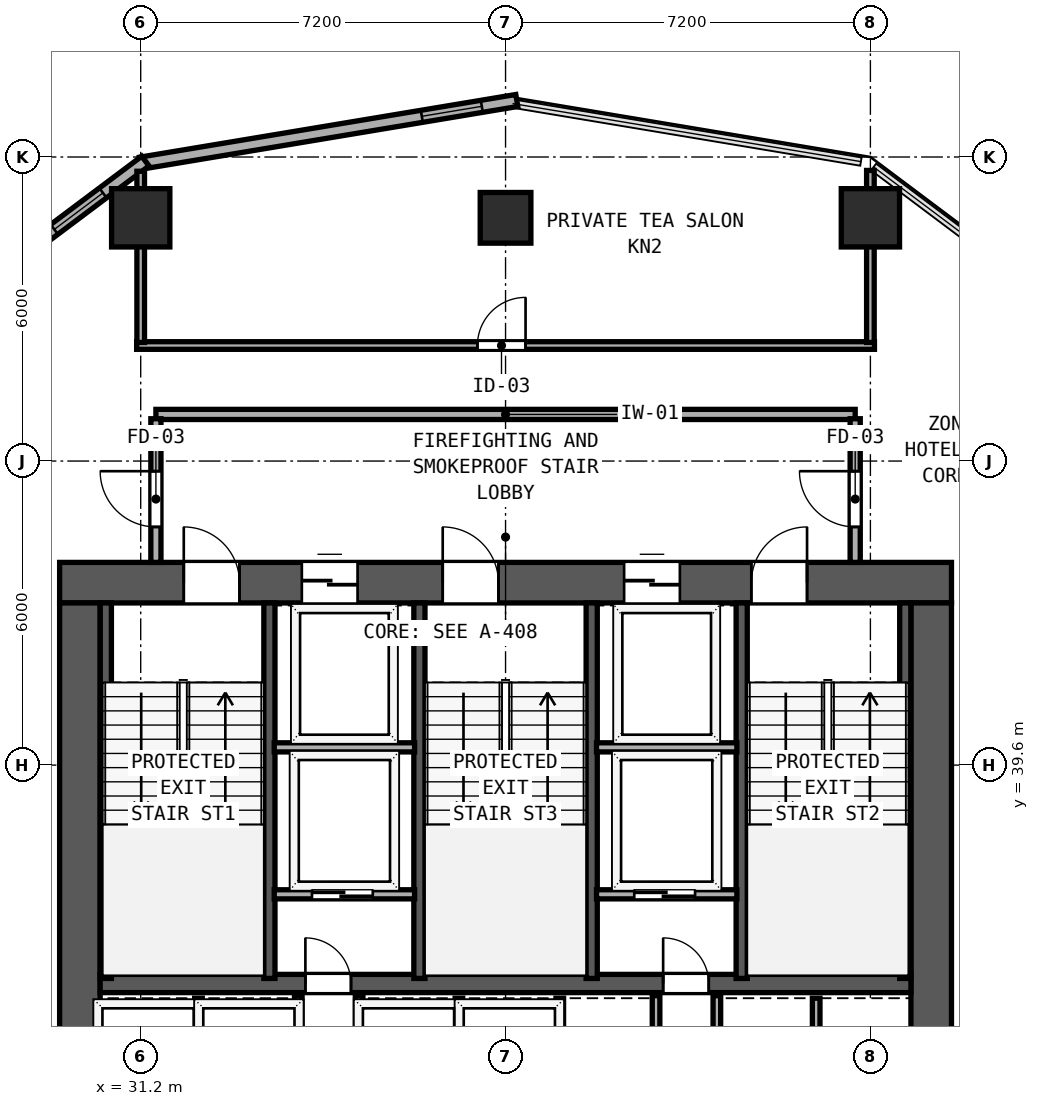
"""IFC4 building model, lengths in metres.
Left out: names, types, materials, properties, quantities, classifications, styles, units other than length and angle.
Written with IfcOpenShell. Run it as: python <this file> out.ifc"""

import sys

from ifc_helpers import new_model, si_unit, direction, frame, frame_2d, origin, origin_2d, place, context, subcontext, project, spatial, rectangle, hollow_rectangle, extrude, element, fill, save


model = new_model("IFC4")
c1 = context("Model", 3, precision=1e-05, world=origin(), true_north=direction((0.0, 1.0)))
c2 = subcontext(c1, "Body", "Model", "MODEL_VIEW")
j1 = project(units=[si_unit("LENGTHUNIT", "METRE"), si_unit("PLANEANGLEUNIT", "RADIAN")], contexts=[c1])
p1 = place(None, origin())
s1 = spatial("IfcSite", under=j1, at=p1, CompositionType="ELEMENT")
p2 = place(p1, origin())
s2 = spatial("IfcBuilding", under=s1, at=p2, CompositionType="ELEMENT")
p3 = place(p2, frame((0.0, 0.0, 59.0)))
s3 = spatial("IfcBuildingStorey", under=s2, at=p3, CompositionType="ELEMENT", Elevation=59.0)
p4 = place(p3, frame((29.6, 43.2, 0.0), z_axis=(0.0, 0.0, 1.0), x_axis=(1.0, 0.0, 0.0)))
e1 = element("IfcWall", 1, at=p4, inside=s3, PredefinedType="SHEAR", context=c2, shape_type="SweptSolid", body=[
    extrude(rectangle(XDim=17.6, YDim=0.8, at=frame_2d((8.8, 0.0))), origin(), (0.0, 0.0, 1.0), 3.6),
])
p5 = place(p4, frame((2.45, 0.0, 0.0)))
e2 = element("IfcOpeningElement", 2, at=p5, cuts=e1, PredefinedType="OPENING", context=c2, shape_type="SweptSolid", body=[
    extrude(rectangle(XDim=1.1, YDim=2.15, at=frame_2d((0.55, 1.075))), frame((0.0, 0.41, 0.0), z_axis=(0.0, -1.0, 0.0), x_axis=(1.0, 0.0, 0.0)), (0.0, 0.0, 1.0), 0.82),
])
p6 = place(p4, frame((7.56, 0.0, 0.0)))
e3 = element("IfcOpeningElement", 3, at=p6, cuts=e1, PredefinedType="OPENING", context=c2, shape_type="SweptSolid", body=[
    extrude(rectangle(XDim=1.1, YDim=2.15, at=frame_2d((0.55, 1.075))), frame((0.0, 0.41, 0.0), z_axis=(0.0, -1.0, 0.0), x_axis=(1.0, 0.0, 0.0)), (0.0, 0.0, 1.0), 0.82),
])
p7 = place(p4, frame((13.65, 0.0, 0.0)))
e4 = element("IfcOpeningElement", 4, at=p7, cuts=e1, PredefinedType="OPENING", context=c2, shape_type="SweptSolid", body=[
    extrude(rectangle(XDim=1.1, YDim=2.15, at=frame_2d((0.55, 1.075))), frame((0.0, 0.41, 0.0), z_axis=(0.0, -1.0, 0.0), x_axis=(1.0, 0.0, 0.0)), (0.0, 0.0, 1.0), 0.82),
])
p8 = place(p4, frame((4.78, 0.0, 0.0)))
e5 = element("IfcOpeningElement", 5, at=p8, cuts=e1, PredefinedType="OPENING", context=c2, shape_type="SweptSolid", body=[
    extrude(rectangle(XDim=1.1, YDim=2.2, at=frame_2d((0.55, 1.1))), frame((0.0, 0.41, 0.0), z_axis=(0.0, -1.0, 0.0), x_axis=(1.0, 0.0, 0.0)), (0.0, 0.0, 1.0), 0.82),
])
p9 = place(p4, frame((11.14, 0.0, 0.0)))
e6 = element("IfcOpeningElement", 6, at=p9, cuts=e1, PredefinedType="OPENING", context=c2, shape_type="SweptSolid", body=[
    extrude(rectangle(XDim=1.1, YDim=2.2, at=frame_2d((0.55, 1.1))), frame((0.0, 0.41, 0.0), z_axis=(0.0, -1.0, 0.0), x_axis=(1.0, 0.0, 0.0)), (0.0, 0.0, 1.0), 0.82),
])
for number, where, z_axis, x_axis in (
    (7, (30.0, 32.8, 0.0), (0.0, 0.0, 1.0), (0.0, 1.0, 0.0)),
    (8, (46.8, 32.8, 0.0), (0.0, 0.0, 1.0), (0.0, 1.0, 0.0)),
):
    element("IfcWall", number, at=place(p3, frame(where, z_axis=z_axis, x_axis=x_axis)), inside=s3, PredefinedType="SHEAR", context=c2, shape_type="SweptSolid", body=[
        extrude(rectangle(XDim=10.0, YDim=0.8, at=frame_2d((5.0, 0.0))), origin(), (0.0, 0.0, 1.0), 3.6),
    ])
p10 = place(p3, frame((30.4, 35.29, 0.0), z_axis=(0.0, 0.0, 1.0), x_axis=(1.0, 0.0, 0.0)))
e9 = element("IfcWall", 9, at=p10, inside=s3, PredefinedType="SHEAR", context=c2, shape_type="SweptSolid", body=[
    extrude(rectangle(XDim=16.0, YDim=0.36, at=frame_2d((8.0, 0.0))), origin(), (0.0, 0.0, 1.0), 3.6),
])
p11 = place(p10, frame((4.95, 0.0, 0.0), z_axis=(0.0, 0.0, 1.0), x_axis=(-1.0, 0.0, 0.0)))
e10 = element("IfcOpeningElement", 10, at=p11, cuts=e9, PredefinedType="OPENING", context=c2, shape_type="SweptSolid", body=[
    extrude(rectangle(XDim=0.9, YDim=2.1, at=frame_2d((0.45, 1.05))), frame((0.0, 0.19, 0.0), z_axis=(0.0, -1.0, 0.0), x_axis=(1.0, 0.0, 0.0)), (0.0, 0.0, 1.0), 0.38),
])
p12 = place(p10, frame((12.01, 0.0, 0.0), z_axis=(0.0, 0.0, 1.0), x_axis=(-1.0, 0.0, 0.0)))
e11 = element("IfcOpeningElement", 11, at=p12, cuts=e9, PredefinedType="OPENING", context=c2, shape_type="SweptSolid", body=[
    extrude(rectangle(XDim=0.9, YDim=2.1, at=frame_2d((0.45, 1.05))), frame((0.0, 0.19, 0.0), z_axis=(0.0, -1.0, 0.0), x_axis=(1.0, 0.0, 0.0)), (0.0, 0.0, 1.0), 0.38),
])
for number, where, z_axis, x_axis in (
    (12, (30.512, 35.39, 0.0), (0.0, 0.0, 1.0), (0.0, 1.0, 0.0)),
    (13, (33.74, 35.39, 0.0), (0.0, 0.0, 1.0), (0.0, 1.0, 0.0)),
    (14, (36.7, 35.39, 0.0), (0.0, 0.0, 1.0), (0.0, 1.0, 0.0)),
    (15, (40.1, 35.39, 0.0), (0.0, 0.0, 1.0), (0.0, 1.0, 0.0)),
    (16, (43.06, 35.39, 0.0), (0.0, 0.0, 1.0), (0.0, 1.0, 0.0)),
    (17, (46.288, 35.39, 0.0), (0.0, 0.0, 1.0), (0.0, 1.0, 0.0)),
):
    element("IfcWall", number, at=place(p3, frame(where, z_axis=z_axis, x_axis=x_axis)), inside=s3, PredefinedType="SHEAR", context=c2, shape_type="SweptSolid", body=[
        extrude(rectangle(XDim=7.41, YDim=0.22, at=frame_2d((3.705, 0.0))), origin(), (0.0, 0.0, 1.0), 3.6),
    ])
for number, where, z_axis, x_axis in (
    (18, (31.2, 50.4, 0.0), (0.0, 0.0, 1.0), (1.0, 0.0, 0.0)),
    (19, (45.6, 50.4, 0.0), (0.0, 0.0, 1.0), (1.0, 0.0, 0.0)),
):
    element("IfcColumn", number, at=place(p3, frame(where, z_axis=z_axis, x_axis=x_axis)), inside=s3, PredefinedType="COLUMN", context=c2, shape_type="SweptSolid", body=[
        extrude(hollow_rectangle(XDim=1.15, YDim=1.15, WallThickness=0.042, at=origin_2d()), origin(), (0.0, 0.0, 1.0), 3.8),
    ])
p13 = place(p3, frame((38.4, 50.4, 0.0), z_axis=(0.0, 0.0, 1.0), x_axis=(1.0, 0.0, 0.0)))
e20 = element("IfcColumn", 20, at=p13, inside=s3, PredefinedType="COLUMN", context=c2, shape_type="SweptSolid", body=[
    extrude(hollow_rectangle(XDim=1.0, YDim=1.0, WallThickness=0.038, at=origin_2d()), origin(), (0.0, 0.0, 1.0), 3.8),
])
p14 = place(p3, frame((38.622, 52.715, 0.0), z_axis=(0.0, 0.0, 1.0), x_axis=(-0.98639129485, -0.164414760418, 0.0)))
e21 = element("IfcWall", 21, at=p14, inside=s3, PredefinedType="SOLIDWALL", context=c2, shape_type="SweptSolid", body=[
    extrude(rectangle(XDim=7.53, YDim=0.24, at=frame_2d((3.765, 0.0))), origin(), (0.0, 0.0, 1.0), 3.6),
])
p15 = place(p14, frame((0.7, 0.0, 0.85)))
e22 = element("IfcOpeningElement", 22, at=p15, cuts=e21, PredefinedType="OPENING", context=c2, shape_type="SweptSolid", body=[
    extrude(rectangle(XDim=1.2, YDim=1.85, at=frame_2d((0.6, 0.925))), frame((0.0, 0.13, 0.0), z_axis=(0.0, -1.0, 0.0), x_axis=(1.0, 0.0, 0.0)), (0.0, 0.0, 1.0), 0.26),
])
p16 = place(p3, frame((31.292, 51.519, 0.0), z_axis=(0.0, 0.0, 1.0), x_axis=(-0.8, -0.6, 0.0)))
e23 = element("IfcWall", 23, at=p16, inside=s3, PredefinedType="SOLIDWALL", context=c2, shape_type="SweptSolid", body=[
    extrude(rectangle(XDim=6.021, YDim=0.24, at=frame_2d((3.01, 0.0))), origin(), (0.0, 0.0, 1.0), 3.6),
])
p17 = place(p16, frame((1.047, 0.0, 0.85)))
e24 = element("IfcOpeningElement", 24, at=p17, cuts=e23, PredefinedType="OPENING", context=c2, shape_type="SweptSolid", body=[
    extrude(rectangle(XDim=1.2, YDim=1.85, at=frame_2d((0.6, 0.925))), frame((0.0, 0.13, 0.0), z_axis=(0.0, -1.0, 0.0), x_axis=(1.0, 0.0, 0.0)), (0.0, 0.0, 1.0), 0.26),
])
p18 = place(p3, frame((31.5, 46.52, 0.0), z_axis=(0.0, 0.0, 1.0), x_axis=(1.0, 0.0, 0.0)))
e25 = element("IfcWall", 25, at=p18, inside=s3, PredefinedType="SOLIDWALL", context=c2, shape_type="SweptSolid", body=[
    extrude(rectangle(XDim=13.8, YDim=0.2, at=frame_2d((6.9, 0.0))), origin(), (0.0, 0.0, 1.0), 3.6),
])
p19 = place(p3, frame((31.5, 43.6, 0.0), z_axis=(0.0, 0.0, 1.0), x_axis=(0.0, 1.0, 0.0)))
e26 = element("IfcWall", 26, at=p19, inside=s3, PredefinedType="SOLIDWALL", context=c2, shape_type="SweptSolid", body=[
    extrude(rectangle(XDim=2.835, YDim=0.2, at=frame_2d((1.417, 0.0))), origin(), (0.0, 0.0, 1.0), 3.6),
])
p20 = place(p19, frame((1.8, 0.0, 0.0), z_axis=(0.0, 0.0, 1.0), x_axis=(-1.0, 0.0, 0.0)))
e27 = element("IfcOpeningElement", 27, at=p20, cuts=e26, PredefinedType="OPENING", context=c2, shape_type="SweptSolid", body=[
    extrude(rectangle(XDim=1.1, YDim=2.15, at=frame_2d((0.55, 1.075))), frame((0.0, 0.11, 0.0), z_axis=(0.0, -1.0, 0.0), x_axis=(1.0, 0.0, 0.0)), (0.0, 0.0, 1.0), 0.22),
])
p21 = place(p3, frame((45.3, 43.6, 0.0), z_axis=(0.0, 0.0, 1.0), x_axis=(0.0, 1.0, 0.0)))
e28 = element("IfcWall", 28, at=p21, inside=s3, PredefinedType="SOLIDWALL", context=c2, shape_type="SweptSolid", body=[
    extrude(rectangle(XDim=2.835, YDim=0.2, at=frame_2d((1.417, 0.0))), origin(), (0.0, 0.0, 1.0), 3.6),
])
p22 = place(p21, frame((0.7, 0.0, 0.0)))
e29 = element("IfcOpeningElement", 29, at=p22, cuts=e28, PredefinedType="OPENING", context=c2, shape_type="SweptSolid", body=[
    extrude(rectangle(XDim=1.1, YDim=2.15, at=frame_2d((0.55, 1.075))), frame((0.0, 0.11, 0.0), z_axis=(0.0, -1.0, 0.0), x_axis=(1.0, 0.0, 0.0)), (0.0, 0.0, 1.0), 0.22),
])
for number, where, z_axis, x_axis in (
    (30, (33.835, 39.95, 0.0), (0.0, 0.0, 1.0), (1.0, 0.0, 0.0)),
    (31, (40.195, 39.95, 0.0), (0.0, 0.0, 1.0), (1.0, 0.0, 0.0)),
):
    element("IfcWall", number, at=place(p3, frame(where, z_axis=z_axis, x_axis=x_axis)), inside=s3, PredefinedType="SOLIDWALL", context=c2, shape_type="SweptSolid", body=[
        extrude(rectangle(XDim=2.77, YDim=0.18, at=frame_2d((1.385, 0.0))), origin(), (0.0, 0.0, 1.0), 3.6),
    ])
p23 = place(p3, frame((33.835, 37.05, 0.0), z_axis=(0.0, 0.0, 1.0), x_axis=(1.0, 0.0, 0.0)))
e32 = element("IfcWall", 32, at=p23, inside=s3, PredefinedType="SOLIDWALL", context=c2, shape_type="SweptSolid", body=[
    extrude(rectangle(XDim=2.77, YDim=0.18, at=frame_2d((1.385, 0.0))), origin(), (0.0, 0.0, 1.0), 3.6),
])
p24 = place(p23, frame((1.945, 0.0, 0.0), z_axis=(0.0, 0.0, 1.0), x_axis=(-1.0, 0.0, 0.0)))
e33 = element("IfcOpeningElement", 33, at=p24, cuts=e32, PredefinedType="OPENING", context=c2, shape_type="SweptSolid", body=[
    extrude(rectangle(XDim=1.2, YDim=2.2, at=frame_2d((0.6, 1.1))), frame((0.0, 0.1, 0.0), z_axis=(0.0, -1.0, 0.0), x_axis=(1.0, 0.0, 0.0)), (0.0, 0.0, 1.0), 0.2),
])
for number, where, z_axis, x_axis in (
    (34, (34.31, 32.88, 0.0), (0.0, 0.0, 1.0), (0.0, 1.0, 0.0)),
    (35, (35.51, 32.88, 0.0), (0.0, 0.0, 1.0), (0.0, 1.0, 0.0)),
):
    element("IfcWall", number, at=place(p3, frame(where, z_axis=z_axis, x_axis=x_axis)), inside=s3, PredefinedType="SOLIDWALL", context=c2, shape_type="SweptSolid", body=[
        extrude(rectangle(XDim=2.17, YDim=0.15, at=frame_2d((1.085, 0.0))), origin(), (0.0, 0.0, 1.0), 3.6),
    ])
p25 = place(p3, frame((40.195, 37.05, 0.0), z_axis=(0.0, 0.0, 1.0), x_axis=(1.0, 0.0, 0.0)))
e36 = element("IfcWall", 36, at=p25, inside=s3, PredefinedType="SOLIDWALL", context=c2, shape_type="SweptSolid", body=[
    extrude(rectangle(XDim=2.77, YDim=0.18, at=frame_2d((1.385, 0.0))), origin(), (0.0, 0.0, 1.0), 3.6),
])
p26 = place(p25, frame((1.945, 0.0, 0.0), z_axis=(0.0, 0.0, 1.0), x_axis=(-1.0, 0.0, 0.0)))
e37 = element("IfcOpeningElement", 37, at=p26, cuts=e36, PredefinedType="OPENING", context=c2, shape_type="SweptSolid", body=[
    extrude(rectangle(XDim=1.2, YDim=2.2, at=frame_2d((0.6, 1.1))), frame((0.0, 0.1, 0.0), z_axis=(0.0, -1.0, 0.0), x_axis=(1.0, 0.0, 0.0)), (0.0, 0.0, 1.0), 0.2),
])
for number, where, z_axis, x_axis in (
    (38, (41.37, 32.88, 0.0), (0.0, 0.0, 1.0), (0.0, 1.0, 0.0)),
    (39, (42.57, 32.88, 0.0), (0.0, 0.0, 1.0), (0.0, 1.0, 0.0)),
):
    element("IfcWall", number, at=place(p3, frame(where, z_axis=z_axis, x_axis=x_axis)), inside=s3, PredefinedType="SOLIDWALL", context=c2, shape_type="SweptSolid", body=[
        extrude(rectangle(XDim=2.17, YDim=0.15, at=frame_2d((1.085, 0.0))), origin(), (0.0, 0.0, 1.0), 3.6),
    ])
for number, where, z_axis, x_axis in (
    (40, (32.34, 32.95, 0.0), (0.0, 0.0, 1.0), (0.0, 1.0, 0.0)),
    (41, (37.48, 32.95, 0.0), (0.0, 0.0, 1.0), (0.0, 1.0, 0.0)),
    (42, (39.47, 32.95, 0.0), (0.0, 0.0, 1.0), (0.0, 1.0, 0.0)),
    (43, (44.53, 32.95, 0.0), (0.0, 0.0, 1.0), (0.0, 1.0, 0.0)),
):
    element("IfcWall", number, at=place(p3, frame(where, z_axis=z_axis, x_axis=x_axis)), inside=s3, PredefinedType="SOLIDWALL", context=c2, shape_type="SweptSolid", body=[
        extrude(rectangle(XDim=2.05, YDim=0.15, at=frame_2d((1.025, 0.0))), origin(), (0.0, 0.0, 1.0), 3.6),
    ])
p27 = place(p3, frame((31.12, 47.88, 0.0), z_axis=(0.0, 0.0, 1.0), x_axis=(1.0, 0.0, 0.0)))
e44 = element("IfcWall", 44, at=p27, inside=s3, PredefinedType="PARTITIONING", context=c2, shape_type="SweptSolid", body=[
    extrude(rectangle(XDim=14.56, YDim=0.15, at=frame_2d((7.28, 0.0))), origin(), (0.0, 0.0, 1.0), 3.6),
])
p28 = place(p27, frame((6.725, 0.0, 0.0)))
e45 = element("IfcOpeningElement", 45, at=p28, cuts=e44, PredefinedType="OPENING", context=c2, shape_type="SweptSolid", body=[
    extrude(rectangle(XDim=0.95, YDim=2.12, at=frame_2d((0.475, 1.06))), frame((0.0, 0.085, 0.0), z_axis=(0.0, -1.0, 0.0), x_axis=(1.0, 0.0, 0.0)), (0.0, 0.0, 1.0), 0.17),
])
p29 = place(p3, frame((31.2, 47.94, 0.0), z_axis=(0.0, 0.0, 1.0), x_axis=(0.0, 1.0, 0.0)))
e46 = element("IfcWall", 46, at=p29, inside=s3, PredefinedType="PARTITIONING", context=c2, shape_type="SweptSolid", body=[
    extrude(rectangle(XDim=3.379, YDim=0.15, at=frame_2d((1.689, 0.0))), origin(), (0.0, 0.0, 1.0), 2.985),
])
p30 = place(p3, frame((45.6, 47.94, 0.0), z_axis=(0.0, 0.0, 1.0), x_axis=(0.0, 1.0, 0.0)))
e47 = element("IfcWall", 47, at=p30, inside=s3, PredefinedType="PARTITIONING", context=c2, shape_type="SweptSolid", body=[
    extrude(rectangle(XDim=3.395, YDim=0.15, at=frame_2d((1.698, 0.0))), origin(), (0.0, 0.0, 1.0), 2.985),
])
p31 = place(p15, origin())
e48 = element("IfcWindow", 48, at=p31, inside=s3, PartitioningType="SINGLE_PANEL", PredefinedType="WINDOW", context=c2, shape_type="SweptSolid", body=[
    extrude(rectangle(XDim=1.2, YDim=1.85, at=frame_2d((0.6, 0.925))), frame((0.0, 0.03, 0.0), z_axis=(0.0, -1.0, 0.0), x_axis=(1.0, 0.0, 0.0)), (0.0, 0.0, 1.0), 0.06),
])
fill(e22, e48)
p32 = place(p17, origin())
e49 = element("IfcWindow", 49, at=p32, inside=s3, PartitioningType="SINGLE_PANEL", PredefinedType="WINDOW", context=c2, shape_type="SweptSolid", body=[
    extrude(rectangle(XDim=1.2, YDim=1.85, at=frame_2d((0.6, 0.925))), frame((0.0, 0.03, 0.0), z_axis=(0.0, -1.0, 0.0), x_axis=(1.0, 0.0, 0.0)), (0.0, 0.0, 1.0), 0.06),
])
fill(e24, e49)
p33 = place(p5, origin())
e50 = element("IfcDoor", 50, at=p33, inside=s3, OperationType="SINGLE_SWING_LEFT", PredefinedType="DOOR", context=c2, shape_type="SweptSolid", body=[
    extrude(rectangle(XDim=1.1, YDim=2.15, at=frame_2d((0.55, 1.075))), frame((0.0, 0.185, 0.0), z_axis=(0.0, -1.0, 0.0), x_axis=(1.0, 0.0, 0.0)), (0.0, 0.0, 1.0), 0.05),
])
fill(e2, e50)
p34 = place(p6, origin())
e51 = element("IfcDoor", 51, at=p34, inside=s3, OperationType="SINGLE_SWING_LEFT", PredefinedType="DOOR", context=c2, shape_type="SweptSolid", body=[
    extrude(rectangle(XDim=1.1, YDim=2.15, at=frame_2d((0.55, 1.075))), frame((0.0, 0.185, 0.0), z_axis=(0.0, -1.0, 0.0), x_axis=(1.0, 0.0, 0.0)), (0.0, 0.0, 1.0), 0.05),
])
fill(e3, e51)
p35 = place(p7, origin())
e52 = element("IfcDoor", 52, at=p35, inside=s3, OperationType="SINGLE_SWING_RIGHT", PredefinedType="DOOR", context=c2, shape_type="SweptSolid", body=[
    extrude(rectangle(XDim=1.1, YDim=2.15, at=frame_2d((0.55, 1.075))), frame((0.0, 0.185, 0.0), z_axis=(0.0, -1.0, 0.0), x_axis=(1.0, 0.0, 0.0)), (0.0, 0.0, 1.0), 0.05),
])
fill(e4, e52)
p36 = place(p20, origin())
e53 = element("IfcDoor", 53, at=p36, inside=s3, OperationType="SINGLE_SWING_LEFT", PredefinedType="DOOR", context=c2, shape_type="SweptSolid", body=[
    extrude(rectangle(XDim=1.1, YDim=2.15, at=frame_2d((0.55, 1.075))), frame((0.0, 0.025, 0.0), z_axis=(0.0, -1.0, 0.0), x_axis=(1.0, 0.0, 0.0)), (0.0, 0.0, 1.0), 0.05),
])
fill(e27, e53)
p37 = place(p22, origin())
e54 = element("IfcDoor", 54, at=p37, inside=s3, OperationType="SINGLE_SWING_RIGHT", PredefinedType="DOOR", context=c2, shape_type="SweptSolid", body=[
    extrude(rectangle(XDim=1.1, YDim=2.15, at=frame_2d((0.55, 1.075))), frame((0.0, 0.025, 0.0), z_axis=(0.0, -1.0, 0.0), x_axis=(1.0, 0.0, 0.0)), (0.0, 0.0, 1.0), 0.05),
])
fill(e29, e54)
p38 = place(p8, origin())
e55 = element("IfcDoor", 55, at=p38, inside=s3, OperationType="SLIDING_TO_LEFT", PredefinedType="DOOR", context=c2, shape_type="SweptSolid", body=[
    extrude(rectangle(XDim=1.1, YDim=2.2, at=frame_2d((0.55, 1.1))), frame((0.0, 0.185, 0.0), z_axis=(0.0, -1.0, 0.0), x_axis=(1.0, 0.0, 0.0)), (0.0, 0.0, 1.0), 0.05),
])
fill(e5, e55)
p39 = place(p9, origin())
e56 = element("IfcDoor", 56, at=p39, inside=s3, OperationType="SLIDING_TO_LEFT", PredefinedType="DOOR", context=c2, shape_type="SweptSolid", body=[
    extrude(rectangle(XDim=1.1, YDim=2.2, at=frame_2d((0.55, 1.1))), frame((0.0, 0.185, 0.0), z_axis=(0.0, -1.0, 0.0), x_axis=(1.0, 0.0, 0.0)), (0.0, 0.0, 1.0), 0.05),
])
fill(e6, e56)
p40 = place(p24, origin())
e57 = element("IfcDoor", 57, at=p40, inside=s3, OperationType="SLIDING_TO_RIGHT", PredefinedType="DOOR", context=c2, shape_type="SweptSolid", body=[
    extrude(rectangle(XDim=1.2, YDim=2.2, at=frame_2d((0.6, 1.1))), frame((0.0, 0.025, 0.0), z_axis=(0.0, -1.0, 0.0), x_axis=(1.0, 0.0, 0.0)), (0.0, 0.0, 1.0), 0.05),
])
fill(e33, e57)
p41 = place(p11, origin())
e58 = element("IfcDoor", 58, at=p41, inside=s3, OperationType="SINGLE_SWING_RIGHT", PredefinedType="DOOR", context=c2, shape_type="SweptSolid", body=[
    extrude(rectangle(XDim=0.9, YDim=2.1, at=frame_2d((0.45, 1.05))), frame((0.0, 0.025, 0.0), z_axis=(0.0, -1.0, 0.0), x_axis=(1.0, 0.0, 0.0)), (0.0, 0.0, 1.0), 0.05),
])
fill(e10, e58)
p42 = place(p26, origin())
e59 = element("IfcDoor", 59, at=p42, inside=s3, OperationType="SLIDING_TO_RIGHT", PredefinedType="DOOR", context=c2, shape_type="SweptSolid", body=[
    extrude(rectangle(XDim=1.2, YDim=2.2, at=frame_2d((0.6, 1.1))), frame((0.0, 0.025, 0.0), z_axis=(0.0, -1.0, 0.0), x_axis=(1.0, 0.0, 0.0)), (0.0, 0.0, 1.0), 0.05),
])
fill(e37, e59)
p43 = place(p12, origin())
e60 = element("IfcDoor", 60, at=p43, inside=s3, OperationType="SINGLE_SWING_RIGHT", PredefinedType="DOOR", context=c2, shape_type="SweptSolid", body=[
    extrude(rectangle(XDim=0.9, YDim=2.1, at=frame_2d((0.45, 1.05))), frame((0.0, 0.025, 0.0), z_axis=(0.0, -1.0, 0.0), x_axis=(1.0, 0.0, 0.0)), (0.0, 0.0, 1.0), 0.05),
])
fill(e11, e60)
p44 = place(p28, origin())
e61 = element("IfcDoor", 61, at=p44, inside=s3, OperationType="SINGLE_SWING_RIGHT", PredefinedType="DOOR", context=c2, shape_type="SweptSolid", body=[
    extrude(rectangle(XDim=0.95, YDim=2.12, at=frame_2d((0.475, 1.06))), frame((0.0, 0.025, 0.0), z_axis=(0.0, -1.0, 0.0), x_axis=(1.0, 0.0, 0.0)), (0.0, 0.0, 1.0), 0.05),
])
fill(e45, e61)
save(model, sys.argv[1])
